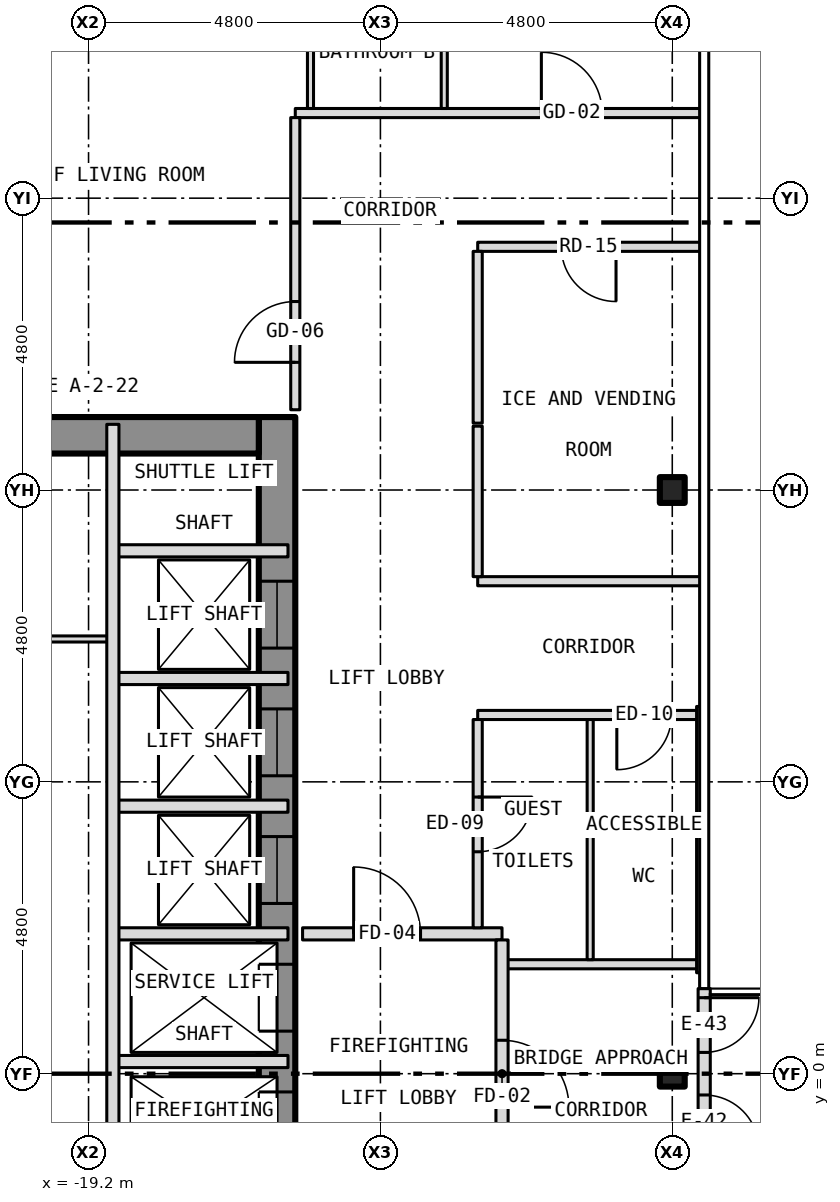
"""IFC4 building model, lengths in metres.
Left out: names, types, materials, properties, quantities, classifications, styles, units other than length and angle.
Written with IfcOpenShell. Run it as: python <this file> out.ifc"""

import sys

from ifc_helpers import new_model, si_unit, direction, frame, frame_2d, origin, origin_2d, place, context, subcontext, project, spatial, rectangle, i_section, extrude, element, fill, save


model = new_model("IFC4")
c1 = context("Model", 3, precision=1e-05, world=origin(), true_north=direction((0.0, 1.0)))
c2 = subcontext(c1, "Body", "Model", "MODEL_VIEW")
j1 = project(units=[si_unit("LENGTHUNIT", "METRE"), si_unit("PLANEANGLEUNIT", "RADIAN")], contexts=[c1])
p1 = place(None, origin())
s1 = spatial("IfcSite", under=j1, at=p1, CompositionType="ELEMENT")
p2 = place(p1, origin())
s2 = spatial("IfcBuilding", under=s1, at=p2, CompositionType="ELEMENT")
p3 = place(p2, frame((0.0, 0.0, 81.0)))
s3 = spatial("IfcBuildingStorey", under=s2, at=p3, CompositionType="ELEMENT", Elevation=81.0)
for number, where, z_axis, x_axis in (
    (1, (-9.6, 0.0, -0.15), (0.0, 0.0, 1.0), (1.0, 0.0, 0.0)),
    (2, (-9.6, 9.6, -0.15), (0.0, 0.0, 1.0), (1.0, 0.0, 0.0)),
):
    element("IfcColumn", number, at=place(p3, frame(where, z_axis=z_axis, x_axis=x_axis)), inside=s3, PredefinedType="COLUMN", context=c2, shape_type="SweptSolid", body=[
        extrude(i_section(OverallWidth=0.409, OverallDepth=0.424, WebThickness=0.033, FlangeThickness=0.052, at=origin_2d()), origin(), (0.0, 0.0, 1.0), 3.35),
    ])
p4 = place(p3, frame((-16.1, -10.8, 0.0), z_axis=(0.0, 0.0, 1.0), x_axis=(0.0, 1.0, 0.0)))
e3 = element("IfcWall", 3, at=p4, inside=s3, PredefinedType="SHEAR", context=c2, shape_type="SweptSolid", body=[
    extrude(rectangle(XDim=21.6, YDim=0.6, at=frame_2d((10.8, 0.0))), origin(), (0.0, 0.0, 1.0), 2.9),
])
p5 = place(p4, frame((9.4, 0.0, 0.0)))
e4 = element("IfcOpeningElement", 4, at=p5, cuts=e3, PredefinedType="OPENING", context=c2, shape_type="SweptSolid", body=[
    extrude(rectangle(XDim=1.1, YDim=2.1, at=frame_2d((0.55, 1.05))), frame((0.0, 0.312, 0.0), z_axis=(0.0, -1.0, 0.0), x_axis=(1.0, 0.0, 0.0)), (0.0, 0.0, 1.0), 0.624),
])
p6 = place(p4, frame((11.5, 0.0, 0.0)))
e5 = element("IfcOpeningElement", 5, at=p6, cuts=e3, PredefinedType="OPENING", context=c2, shape_type="SweptSolid", body=[
    extrude(rectangle(XDim=1.1, YDim=2.1, at=frame_2d((0.55, 1.05))), frame((0.0, 0.312, 0.0), z_axis=(0.0, -1.0, 0.0), x_axis=(1.0, 0.0, 0.0)), (0.0, 0.0, 1.0), 0.624),
])
p7 = place(p4, frame((13.6, 0.0, 0.0)))
e6 = element("IfcOpeningElement", 6, at=p7, cuts=e3, PredefinedType="OPENING", context=c2, shape_type="SweptSolid", body=[
    extrude(rectangle(XDim=1.1, YDim=2.1, at=frame_2d((0.55, 1.05))), frame((0.0, 0.312, 0.0), z_axis=(0.0, -1.0, 0.0), x_axis=(1.0, 0.0, 0.0)), (0.0, 0.0, 1.0), 0.624),
])
p8 = place(p4, frame((15.7, 0.0, 0.0)))
e7 = element("IfcOpeningElement", 7, at=p8, cuts=e3, PredefinedType="OPENING", context=c2, shape_type="SweptSolid", body=[
    extrude(rectangle(XDim=1.1, YDim=2.1, at=frame_2d((0.55, 1.05))), frame((0.0, 0.312, 0.0), z_axis=(0.0, -1.0, 0.0), x_axis=(1.0, 0.0, 0.0)), (0.0, 0.0, 1.0), 0.624),
])
p9 = place(p4, frame((17.8, 0.0, 0.0)))
e8 = element("IfcOpeningElement", 8, at=p9, cuts=e3, PredefinedType="OPENING", context=c2, shape_type="SweptSolid", body=[
    extrude(rectangle(XDim=1.1, YDim=2.1, at=frame_2d((0.55, 1.05))), frame((0.0, 0.312, 0.0), z_axis=(0.0, -1.0, 0.0), x_axis=(1.0, 0.0, 0.0)), (0.0, 0.0, 1.0), 0.624),
])
p10 = place(p4, frame((0.758, 0.0, 0.0)))
e9 = element("IfcOpeningElement", 9, at=p10, cuts=e3, PredefinedType="OPENING", context=c2, shape_type="SweptSolid", body=[
    extrude(rectangle(XDim=1.1, YDim=2.1, at=frame_2d((0.55, 1.05))), frame((0.0, 0.312, 0.0), z_axis=(0.0, -1.0, 0.0), x_axis=(1.0, 0.0, 0.0)), (0.0, 0.0, 1.0), 0.624),
])
p11 = place(p4, frame((7.5, 0.0, 0.0)))
e10 = element("IfcOpeningElement", 10, at=p11, cuts=e3, PredefinedType="OPENING", context=c2, shape_type="SweptSolid", body=[
    extrude(rectangle(XDim=1.1, YDim=2.1, at=frame_2d((0.55, 1.05))), frame((0.0, 0.312, 0.0), z_axis=(0.0, -1.0, 0.0), x_axis=(1.0, 0.0, 0.0)), (0.0, 0.0, 1.0), 0.624),
])
p12 = place(p3, frame((-23.4, 10.5, 0.0), z_axis=(0.0, 0.0, 1.0), x_axis=(1.0, 0.0, 0.0)))
e11 = element("IfcWall", 11, at=p12, inside=s3, PredefinedType="SHEAR", context=c2, shape_type="SweptSolid", body=[
    extrude(rectangle(XDim=7.0, YDim=0.6, at=frame_2d((3.5, 0.0))), origin(), (0.0, 0.0, 1.0), 2.9),
])
p13 = place(p3, frame((-9.075, -1.4, 0.0), z_axis=(0.0, 0.0, 1.0), x_axis=(0.0, 1.0, 0.0)))
e12 = element("IfcWall", 12, at=p13, inside=s3, PredefinedType="SOLIDWALL", context=c2, shape_type="SweptSolid", body=[
    extrude(rectangle(XDim=2.8, YDim=0.2, at=frame_2d((1.4, 0.0))), origin(), (0.0, 0.0, 1.0), 3.5),
])
p14 = place(p13, frame((0.15, 0.0, 0.0)))
e13 = element("IfcOpeningElement", 13, at=p14, cuts=e12, PredefinedType="OPENING", context=c2, shape_type="SweptSolid", body=[
    extrude(rectangle(XDim=0.9, YDim=2.1, at=frame_2d((0.45, 1.05))), frame((0.0, 0.112, 0.0), z_axis=(0.0, -1.0, 0.0), x_axis=(1.0, 0.0, 0.0)), (0.0, 0.0, 1.0), 0.224),
])
p15 = place(p13, frame((1.75, 0.0, 0.0)))
e14 = element("IfcOpeningElement", 14, at=p15, cuts=e12, PredefinedType="OPENING", context=c2, shape_type="SweptSolid", body=[
    extrude(rectangle(XDim=0.9, YDim=2.1, at=frame_2d((0.45, 1.05))), frame((0.0, 0.112, 0.0), z_axis=(0.0, -1.0, 0.0), x_axis=(1.0, 0.0, 0.0)), (0.0, 0.0, 1.0), 0.224),
])
p16 = place(p3, frame((-18.8, 0.2, 0.0), z_axis=(0.0, 0.0, 1.0), x_axis=(1.0, 0.0, 0.0)))
e15 = element("IfcWall", 15, at=p16, inside=s3, PredefinedType="PARTITIONING", context=c2, shape_type="SweptSolid", body=[
    extrude(rectangle(XDim=2.88, YDim=0.2, at=frame_2d((1.44, 0.0))), origin(), (0.0, 0.0, 1.0), 2.9),
])
p17 = place(p3, frame((-12.4, 1.8, 0.0), z_axis=(0.0, 0.0, 1.0), x_axis=(1.0, 0.0, 0.0)))
e16 = element("IfcWall", 16, at=p17, inside=s3, PredefinedType="PARTITIONING", context=c2, shape_type="SweptSolid", body=[
    extrude(rectangle(XDim=3.25, YDim=0.15, at=frame_2d((1.625, 0.0))), origin(), (0.0, 0.0, 1.0), 3.2),
])
p18 = place(p3, frame((-18.8, 2.3, 0.0), z_axis=(0.0, 0.0, 1.0), x_axis=(1.0, 0.0, 0.0)))
e17 = element("IfcWall", 17, at=p18, inside=s3, PredefinedType="PARTITIONING", context=c2, shape_type="SweptSolid", body=[
    extrude(rectangle(XDim=2.88, YDim=0.2, at=frame_2d((1.44, 0.0))), origin(), (0.0, 0.0, 1.0), 2.9),
])
p19 = place(p3, frame((-15.68, 2.3, 0.0), z_axis=(0.0, 0.0, 1.0), x_axis=(1.0, 0.0, 0.0)))
e18 = element("IfcWall", 18, at=p19, inside=s3, PredefinedType="PARTITIONING", context=c2, shape_type="SweptSolid", body=[
    extrude(rectangle(XDim=3.28, YDim=0.2, at=frame_2d((1.64, 0.0))), origin(), (0.0, 0.0, 1.0), 3.2),
])
p20 = place(p19, frame((0.84, 0.0, 0.0)))
e19 = element("IfcOpeningElement", 19, at=p20, cuts=e18, PredefinedType="OPENING", context=c2, shape_type="SweptSolid", body=[
    extrude(rectangle(XDim=1.1, YDim=2.1, at=frame_2d((0.55, 1.05))), frame((0.0, 0.112, 0.0), z_axis=(0.0, -1.0, 0.0), x_axis=(1.0, 0.0, 0.0)), (0.0, 0.0, 1.0), 0.224),
])
p21 = place(p3, frame((-18.8, 4.4, 0.0), z_axis=(0.0, 0.0, 1.0), x_axis=(1.0, 0.0, 0.0)))
e20 = element("IfcWall", 20, at=p21, inside=s3, PredefinedType="PARTITIONING", context=c2, shape_type="SweptSolid", body=[
    extrude(rectangle(XDim=2.88, YDim=0.2, at=frame_2d((1.44, 0.0))), origin(), (0.0, 0.0, 1.0), 2.9),
])
p22 = place(p3, frame((-12.8, 5.9, 0.0), z_axis=(0.0, 0.0, 1.0), x_axis=(1.0, 0.0, 0.0)))
e21 = element("IfcWall", 21, at=p22, inside=s3, PredefinedType="PARTITIONING", context=c2, shape_type="SweptSolid", body=[
    extrude(rectangle(XDim=3.65, YDim=0.15, at=frame_2d((1.825, 0.0))), origin(), (0.0, 0.0, 1.0), 3.2),
])
p23 = place(p22, frame((2.288, 0.0, 0.0)))
e22 = element("IfcOpeningElement", 22, at=p23, cuts=e21, PredefinedType="OPENING", context=c2, shape_type="SweptSolid", body=[
    extrude(rectangle(XDim=0.9, YDim=2.1, at=frame_2d((0.45, 1.05))), frame((0.0, 0.087, 0.0), z_axis=(0.0, -1.0, 0.0), x_axis=(1.0, 0.0, 0.0)), (0.0, 0.0, 1.0), 0.174),
])
p24 = place(p3, frame((-18.8, 6.5, 0.0), z_axis=(0.0, 0.0, 1.0), x_axis=(1.0, 0.0, 0.0)))
e23 = element("IfcWall", 23, at=p24, inside=s3, PredefinedType="PARTITIONING", context=c2, shape_type="SweptSolid", body=[
    extrude(rectangle(XDim=2.88, YDim=0.2, at=frame_2d((1.44, 0.0))), origin(), (0.0, 0.0, 1.0), 2.9),
])
p25 = place(p3, frame((-23.88, 7.15, 0.0), z_axis=(0.0, 0.0, 1.0), x_axis=(1.0, 0.0, 0.0)))
e24 = element("IfcWall", 24, at=p25, inside=s3, PredefinedType="PARTITIONING", context=c2, shape_type="SweptSolid", body=[
    extrude(rectangle(XDim=5.08, YDim=0.1, at=frame_2d((2.54, 0.0))), origin(), (0.0, 0.0, 1.0), 2.9),
])
p26 = place(p25, frame((2.03, 0.0, 0.0)))
e25 = element("IfcOpeningElement", 25, at=p26, cuts=e24, PredefinedType="OPENING", context=c2, shape_type="SweptSolid", body=[
    extrude(rectangle(XDim=0.9, YDim=2.1, at=frame_2d((0.45, 1.05))), frame((0.0, 0.062, 0.0), z_axis=(0.0, -1.0, 0.0), x_axis=(1.0, 0.0, 0.0)), (0.0, 0.0, 1.0), 0.124),
])
p27 = place(p3, frame((-12.8, 8.1, 0.0), z_axis=(0.0, 0.0, 1.0), x_axis=(1.0, 0.0, 0.0)))
e26 = element("IfcWall", 26, at=p27, inside=s3, PredefinedType="PARTITIONING", context=c2, shape_type="SweptSolid", body=[
    extrude(rectangle(XDim=3.68, YDim=0.15, at=frame_2d((1.84, 0.0))), origin(), (0.0, 0.0, 1.0), 3.2),
])
p28 = place(p3, frame((-18.8, 8.6, 0.0), z_axis=(0.0, 0.0, 1.0), x_axis=(1.0, 0.0, 0.0)))
e27 = element("IfcWall", 27, at=p28, inside=s3, PredefinedType="PARTITIONING", context=c2, shape_type="SweptSolid", body=[
    extrude(rectangle(XDim=2.88, YDim=0.2, at=frame_2d((1.44, 0.0))), origin(), (0.0, 0.0, 1.0), 2.9),
])
p29 = place(p3, frame((-12.8, 13.6, 0.0), z_axis=(0.0, 0.0, 1.0), x_axis=(1.0, 0.0, 0.0)))
e28 = element("IfcWall", 28, at=p29, inside=s3, PredefinedType="PARTITIONING", context=c2, shape_type="SweptSolid", body=[
    extrude(rectangle(XDim=3.68, YDim=0.15, at=frame_2d((1.84, 0.0))), origin(), (0.0, 0.0, 1.0), 3.2),
])
p30 = place(p29, frame((1.375, 0.0, 0.0)))
e29 = element("IfcOpeningElement", 29, at=p30, cuts=e28, PredefinedType="OPENING", context=c2, shape_type="SweptSolid", body=[
    extrude(rectangle(XDim=0.9, YDim=2.1, at=frame_2d((0.45, 1.05))), frame((0.0, 0.087, 0.0), z_axis=(0.0, -1.0, 0.0), x_axis=(1.0, 0.0, 0.0)), (0.0, 0.0, 1.0), 0.174),
])
p31 = place(p3, frame((-15.8, 15.8, 0.0), z_axis=(0.0, 0.0, 1.0), x_axis=(1.0, 0.0, 0.0)))
e30 = element("IfcWall", 30, at=p31, inside=s3, PredefinedType="PARTITIONING", context=c2, shape_type="SweptSolid", body=[
    extrude(rectangle(XDim=6.68, YDim=0.15, at=frame_2d((3.34, 0.0))), origin(), (0.0, 0.0, 1.0), 3.2),
])
p32 = place(p31, frame((4.047, 0.0, 0.0)))
e31 = element("IfcOpeningElement", 31, at=p32, cuts=e30, PredefinedType="OPENING", context=c2, shape_type="SweptSolid", body=[
    extrude(rectangle(XDim=1.0, YDim=2.1, at=frame_2d((0.5, 1.05))), frame((0.0, 0.087, 0.0), z_axis=(0.0, -1.0, 0.0), x_axis=(1.0, 0.0, 0.0)), (0.0, 0.0, 1.0), 0.174),
])
p33 = place(p3, frame((-18.8, -1.8, 0.0), z_axis=(0.0, 0.0, 1.0), x_axis=(0.0, 1.0, 0.0)))
e32 = element("IfcWall", 32, at=p33, inside=s3, PredefinedType="PARTITIONING", context=c2, shape_type="SweptSolid", body=[
    extrude(rectangle(XDim=12.48, YDim=0.2, at=frame_2d((6.24, 0.0))), origin(), (0.0, 0.0, 1.0), 2.9),
])
p34 = place(p3, frame((-15.8, 10.92, 0.0), z_axis=(0.0, 0.0, 1.0), x_axis=(0.0, 1.0, 0.0)))
e33 = element("IfcWall", 33, at=p34, inside=s3, PredefinedType="PARTITIONING", context=c2, shape_type="SweptSolid", body=[
    extrude(rectangle(XDim=4.805, YDim=0.15, at=frame_2d((2.403, 0.0))), origin(), (0.0, 0.0, 1.0), 3.2),
])
p35 = place(p34, frame((0.78, 0.0, 0.0)))
e34 = element("IfcOpeningElement", 34, at=p35, cuts=e33, PredefinedType="OPENING", context=c2, shape_type="SweptSolid", body=[
    extrude(rectangle(XDim=1.0, YDim=2.1, at=frame_2d((0.5, 1.05))), frame((0.0, 0.087, 0.0), z_axis=(0.0, -1.0, 0.0), x_axis=(1.0, 0.0, 0.0)), (0.0, 0.0, 1.0), 0.174),
])
p36 = place(p3, frame((-15.55, 15.875, 0.0), z_axis=(0.0, 0.0, 1.0), x_axis=(0.0, 1.0, 0.0)))
e35 = element("IfcWall", 35, at=p36, inside=s3, PredefinedType="PARTITIONING", context=c2, shape_type="SweptSolid", body=[
    extrude(rectangle(XDim=8.005, YDim=0.1, at=frame_2d((4.002, 0.0))), origin(), (0.0, 0.0, 1.0), 3.2),
])
p37 = place(p3, frame((-13.35, 15.875, 0.0), z_axis=(0.0, 0.0, 1.0), x_axis=(0.0, 1.0, 0.0)))
e36 = element("IfcWall", 36, at=p37, inside=s3, PredefinedType="PARTITIONING", context=c2, shape_type="SweptSolid", body=[
    extrude(rectangle(XDim=3.075, YDim=0.1, at=frame_2d((1.538, 0.0))), origin(), (0.0, 0.0, 1.0), 3.2),
])
p38 = place(p37, frame((1.971, 0.0, 0.0)))
e37 = element("IfcOpeningElement", 37, at=p38, cuts=e36, PredefinedType="OPENING", context=c2, shape_type="SweptSolid", body=[
    extrude(rectangle(XDim=0.9, YDim=2.1, at=frame_2d((0.45, 1.05))), frame((0.0, 0.062, 0.0), z_axis=(0.0, -1.0, 0.0), x_axis=(1.0, 0.0, 0.0)), (0.0, 0.0, 1.0), 0.124),
])
p39 = place(p3, frame((-12.8, 2.4, 0.0), z_axis=(0.0, 0.0, 1.0), x_axis=(0.0, 1.0, 0.0)))
e38 = element("IfcWall", 38, at=p39, inside=s3, PredefinedType="PARTITIONING", context=c2, shape_type="SweptSolid", body=[
    extrude(rectangle(XDim=3.425, YDim=0.15, at=frame_2d((1.712, 0.0))), origin(), (0.0, 0.0, 1.0), 3.2),
])
p40 = place(p39, frame((1.25, 0.0, 0.0)))
e39 = element("IfcOpeningElement", 39, at=p40, cuts=e38, PredefinedType="OPENING", context=c2, shape_type="SweptSolid", body=[
    extrude(rectangle(XDim=0.9, YDim=2.1, at=frame_2d((0.45, 1.05))), frame((0.0, 0.087, 0.0), z_axis=(0.0, -1.0, 0.0), x_axis=(1.0, 0.0, 0.0)), (0.0, 0.0, 1.0), 0.174),
])
p41 = place(p3, frame((-12.8, 8.175, 0.0), z_axis=(0.0, 0.0, 1.0), x_axis=(0.0, 1.0, 0.0)))
e40 = element("IfcWall", 40, at=p41, inside=s3, PredefinedType="PARTITIONING", context=c2, shape_type="SweptSolid", body=[
    extrude(rectangle(XDim=2.475, YDim=0.15, at=frame_2d((1.237, 0.0))), origin(), (0.0, 0.0, 1.0), 3.2),
])
p42 = place(p3, frame((-12.8, 10.7, 0.0), z_axis=(0.0, 0.0, 1.0), x_axis=(0.0, 1.0, 0.0)))
e41 = element("IfcWall", 41, at=p42, inside=s3, PredefinedType="PARTITIONING", context=c2, shape_type="SweptSolid", body=[
    extrude(rectangle(XDim=2.825, YDim=0.15, at=frame_2d((1.413, 0.0))), origin(), (0.0, 0.0, 1.0), 3.2),
])
p43 = place(p3, frame((-12.4, -1.8, 0.0), z_axis=(0.0, 0.0, 1.0), x_axis=(0.0, 1.0, 0.0)))
e42 = element("IfcWall", 42, at=p43, inside=s3, PredefinedType="PARTITIONING", context=c2, shape_type="SweptSolid", body=[
    extrude(rectangle(XDim=4.0, YDim=0.2, at=frame_2d((2.0, 0.0))), origin(), (0.0, 0.0, 1.0), 3.2),
])
p44 = place(p43, frame((1.25, 0.0, 0.0)))
e43 = element("IfcOpeningElement", 43, at=p44, cuts=e42, PredefinedType="OPENING", context=c2, shape_type="SweptSolid", body=[
    extrude(rectangle(XDim=1.1, YDim=2.1, at=frame_2d((0.55, 1.05))), frame((0.0, 0.112, 0.0), z_axis=(0.0, -1.0, 0.0), x_axis=(1.0, 0.0, 0.0)), (0.0, 0.0, 1.0), 0.224),
])
p45 = place(p3, frame((-10.95, 1.875, 0.0), z_axis=(0.0, 0.0, 1.0), x_axis=(0.0, 1.0, 0.0)))
e44 = element("IfcWall", 44, at=p45, inside=s3, PredefinedType="PARTITIONING", context=c2, shape_type="SweptSolid", body=[
    extrude(rectangle(XDim=3.95, YDim=0.1, at=frame_2d((1.975, 0.0))), origin(), (0.0, 0.0, 1.0), 3.2),
])
p46 = place(p3, frame((-9.15, 1.66, 0.0), z_axis=(0.0, 0.0, 1.0), x_axis=(0.0, 1.0, 0.0)))
e45 = element("IfcWall", 45, at=p46, inside=s3, PredefinedType="PARTITIONING", context=c2, shape_type="SweptSolid", body=[
    extrude(rectangle(XDim=4.38, YDim=0.1, at=frame_2d((2.19, 0.0))), origin(), (0.0, 0.0, 1.0), 3.2),
])
p47 = place(p14, origin())
e46 = element("IfcDoor", 46, at=p47, inside=s3, OperationType="SINGLE_SWING_LEFT", PredefinedType="DOOR", context=c2, shape_type="SweptSolid", body=[
    extrude(rectangle(XDim=0.9, YDim=2.1, at=frame_2d((0.45, 1.05))), frame((0.0, 0.025, 0.0), z_axis=(0.0, -1.0, 0.0), x_axis=(1.0, 0.0, 0.0)), (0.0, 0.0, 1.0), 0.05),
])
fill(e13, e46)
p48 = place(p15, origin())
e47 = element("IfcDoor", 47, at=p48, inside=s3, OperationType="SINGLE_SWING_RIGHT", PredefinedType="DOOR", context=c2, shape_type="SweptSolid", body=[
    extrude(rectangle(XDim=0.9, YDim=2.1, at=frame_2d((0.45, 1.05))), frame((0.0, 0.025, 0.0), z_axis=(0.0, -1.0, 0.0), x_axis=(1.0, 0.0, 0.0)), (0.0, 0.0, 1.0), 0.05),
])
fill(e14, e47)
p49 = place(p5, origin())
e48 = element("IfcDoor", 48, at=p49, inside=s3, OperationType="SLIDING_TO_LEFT", PredefinedType="DOOR", context=c2, shape_type="SweptSolid", body=[
    extrude(rectangle(XDim=1.1, YDim=2.1, at=frame_2d((0.55, 1.05))), frame((0.0, 0.025, 0.0), z_axis=(0.0, -1.0, 0.0), x_axis=(1.0, 0.0, 0.0)), (0.0, 0.0, 1.0), 0.05),
])
fill(e4, e48)
p50 = place(p6, origin())
e49 = element("IfcDoor", 49, at=p50, inside=s3, OperationType="SLIDING_TO_LEFT", PredefinedType="DOOR", context=c2, shape_type="SweptSolid", body=[
    extrude(rectangle(XDim=1.1, YDim=2.1, at=frame_2d((0.55, 1.05))), frame((0.0, 0.025, 0.0), z_axis=(0.0, -1.0, 0.0), x_axis=(1.0, 0.0, 0.0)), (0.0, 0.0, 1.0), 0.05),
])
fill(e5, e49)
p51 = place(p7, origin())
e50 = element("IfcDoor", 50, at=p51, inside=s3, OperationType="SLIDING_TO_LEFT", PredefinedType="DOOR", context=c2, shape_type="SweptSolid", body=[
    extrude(rectangle(XDim=1.1, YDim=2.1, at=frame_2d((0.55, 1.05))), frame((0.0, 0.025, 0.0), z_axis=(0.0, -1.0, 0.0), x_axis=(1.0, 0.0, 0.0)), (0.0, 0.0, 1.0), 0.05),
])
fill(e6, e50)
p52 = place(p8, origin())
e51 = element("IfcDoor", 51, at=p52, inside=s3, OperationType="SLIDING_TO_LEFT", PredefinedType="DOOR", context=c2, shape_type="SweptSolid", body=[
    extrude(rectangle(XDim=1.1, YDim=2.1, at=frame_2d((0.55, 1.05))), frame((0.0, 0.025, 0.0), z_axis=(0.0, -1.0, 0.0), x_axis=(1.0, 0.0, 0.0)), (0.0, 0.0, 1.0), 0.05),
])
fill(e7, e51)
p53 = place(p9, origin())
e52 = element("IfcDoor", 52, at=p53, inside=s3, OperationType="SLIDING_TO_LEFT", PredefinedType="DOOR", context=c2, shape_type="SweptSolid", body=[
    extrude(rectangle(XDim=1.1, YDim=2.1, at=frame_2d((0.55, 1.05))), frame((0.0, 0.025, 0.0), z_axis=(0.0, -1.0, 0.0), x_axis=(1.0, 0.0, 0.0)), (0.0, 0.0, 1.0), 0.05),
])
fill(e8, e52)
p54 = place(p44, origin())
e53 = element("IfcDoor", 53, at=p54, inside=s3, OperationType="SINGLE_SWING_LEFT", PredefinedType="DOOR", context=c2, shape_type="SweptSolid", body=[
    extrude(rectangle(XDim=1.1, YDim=2.1, at=frame_2d((0.55, 1.05))), frame((0.0, 0.025, 0.0), z_axis=(0.0, -1.0, 0.0), x_axis=(1.0, 0.0, 0.0)), (0.0, 0.0, 1.0), 0.05),
])
fill(e43, e53)
p55 = place(p20, origin())
e54 = element("IfcDoor", 54, at=p55, inside=s3, OperationType="SINGLE_SWING_LEFT", PredefinedType="DOOR", context=c2, shape_type="SweptSolid", body=[
    extrude(rectangle(XDim=1.1, YDim=2.1, at=frame_2d((0.55, 1.05))), frame((0.0, 0.025, 0.0), z_axis=(0.0, -1.0, 0.0), x_axis=(1.0, 0.0, 0.0)), (0.0, 0.0, 1.0), 0.05),
])
fill(e19, e54)
p56 = place(p32, origin())
e55 = element("IfcDoor", 55, at=p56, inside=s3, OperationType="SINGLE_SWING_LEFT", PredefinedType="DOOR", context=c2, shape_type="SweptSolid", body=[
    extrude(rectangle(XDim=1.0, YDim=2.1, at=frame_2d((0.5, 1.05))), frame((0.0, 0.025, 0.0), z_axis=(0.0, -1.0, 0.0), x_axis=(1.0, 0.0, 0.0)), (0.0, 0.0, 1.0), 0.05),
])
fill(e31, e55)
p57 = place(p35, origin())
e56 = element("IfcDoor", 56, at=p57, inside=s3, OperationType="SINGLE_SWING_LEFT", PredefinedType="DOOR", context=c2, shape_type="SweptSolid", body=[
    extrude(rectangle(XDim=1.0, YDim=2.1, at=frame_2d((0.5, 1.05))), frame((0.0, 0.025, 0.0), z_axis=(0.0, -1.0, 0.0), x_axis=(1.0, 0.0, 0.0)), (0.0, 0.0, 1.0), 0.05),
])
fill(e34, e56)
p58 = place(p40, origin())
e57 = element("IfcDoor", 57, at=p58, inside=s3, OperationType="SINGLE_SWING_RIGHT", PredefinedType="DOOR", context=c2, shape_type="SweptSolid", body=[
    extrude(rectangle(XDim=0.9, YDim=2.1, at=frame_2d((0.45, 1.05))), frame((0.0, 0.025, 0.0), z_axis=(0.0, -1.0, 0.0), x_axis=(1.0, 0.0, 0.0)), (0.0, 0.0, 1.0), 0.05),
])
fill(e39, e57)
p59 = place(p23, origin())
e58 = element("IfcDoor", 58, at=p59, inside=s3, OperationType="SINGLE_SWING_LEFT", PredefinedType="DOOR", context=c2, shape_type="SweptSolid", body=[
    extrude(rectangle(XDim=0.9, YDim=2.1, at=frame_2d((0.45, 1.05))), frame((0.0, 0.025, 0.0), z_axis=(0.0, -1.0, 0.0), x_axis=(1.0, 0.0, 0.0)), (0.0, 0.0, 1.0), 0.05),
])
fill(e22, e58)
p60 = place(p30, origin())
e59 = element("IfcDoor", 59, at=p60, inside=s3, OperationType="SINGLE_SWING_RIGHT", PredefinedType="DOOR", context=c2, shape_type="SweptSolid", body=[
    extrude(rectangle(XDim=0.9, YDim=2.1, at=frame_2d((0.45, 1.05))), frame((0.0, 0.025, 0.0), z_axis=(0.0, -1.0, 0.0), x_axis=(1.0, 0.0, 0.0)), (0.0, 0.0, 1.0), 0.05),
])
fill(e29, e59)
save(model, sys.argv[1])
